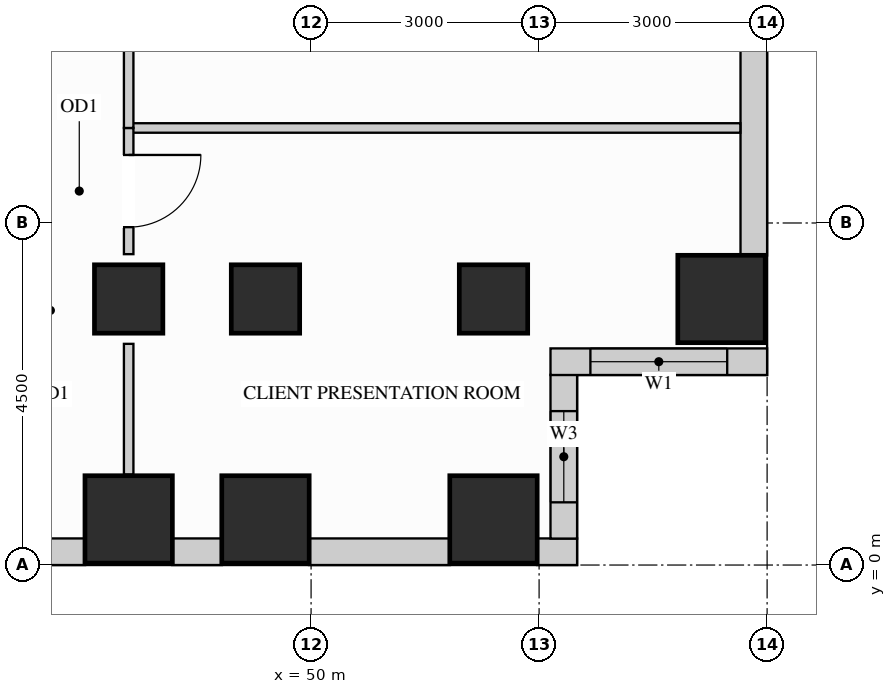
"""IFC4 building model, lengths in metres.
Left out: names, types, materials, properties, quantities, classifications, styles, units other than length and angle.
Written with IfcOpenShell. Run it as: python <this file> out.ifc"""

import sys

from ifc_helpers import new_model, si_unit, direction, frame, frame_2d, origin, origin_2d, place, context, subcontext, project, spatial, rectangle, extrude, source, transform, mapped, element, fill, save


model = new_model("IFC4")
c1 = context("Model", 3, precision=1e-05, world=origin(), true_north=direction((0.0, 1.0)))
c2 = subcontext(c1, "Body", "Model", "MODEL_VIEW")
j1 = project(units=[si_unit("LENGTHUNIT", "METRE"), si_unit("PLANEANGLEUNIT", "RADIAN")], contexts=[c1])
p1 = place(None, origin())
s1 = spatial("IfcSite", under=j1, at=p1, CompositionType="ELEMENT")
p2 = place(p1, origin())
s2 = spatial("IfcBuilding", under=s1, at=p2, CompositionType="ELEMENT")
p3 = place(p2, frame((0.0, 0.0, 84.6)))
s3 = spatial("IfcBuildingStorey", under=s2, at=p3, CompositionType="ELEMENT", Elevation=84.6)
m1 = source(origin(), c2, "Body", "SweptSolid", [
    extrude(rectangle(XDim=0.9, YDim=0.9, at=origin_2d()), origin(), (0.0, 0.0, 1.0), 3.38),
])
for number, where, z_axis, x_axis in (
    (1, (47.6, 3.5, 0.0), (0.0, 0.0, 1.0), (1.0, 0.0, 0.0)),
    (2, (49.4, 3.5, 0.0), (0.0, 0.0, 1.0), (1.0, 0.0, 0.0)),
    (3, (52.4, 3.5, 0.0), (0.0, 0.0, 1.0), (1.0, 0.0, 0.0)),
):
    element("IfcColumn", number, at=place(p3, frame(where, z_axis=z_axis, x_axis=x_axis)), inside=s3, PredefinedType="COLUMN", context=c2, shape_type="MappedRepresentation", body=[
        mapped(m1, transform((0.0, 0.0, 0.0), x_axis=(1.0, 0.0, 0.0), y_axis=(0.0, 1.0, 0.0), z_axis=(0.0, 0.0, 1.0))),
    ])
m2 = source(origin(), c2, "Body", "SweptSolid", [
    extrude(rectangle(XDim=1.15, YDim=1.15, at=origin_2d()), origin(), (0.0, 0.0, 1.0), 3.38),
])
for number, where, z_axis, x_axis in (
    (4, (55.4, 3.5, 0.0), (0.0, 0.0, 1.0), (1.0, 0.0, 0.0)),
    (5, (47.6, 0.6, 0.0), (0.0, 0.0, 1.0), (1.0, 0.0, 0.0)),
    (6, (49.4, 0.6, 0.0), (0.0, 0.0, 1.0), (1.0, 0.0, 0.0)),
    (7, (52.4, 0.6, 0.0), (0.0, 0.0, 1.0), (1.0, 0.0, 0.0)),
):
    element("IfcColumn", number, at=place(p3, frame(where, z_axis=z_axis, x_axis=x_axis)), inside=s3, PredefinedType="COLUMN", context=c2, shape_type="MappedRepresentation", body=[
        mapped(m2, transform((0.0, 0.0, 0.0), x_axis=(1.0, 0.0, 0.0), y_axis=(0.0, 1.0, 0.0), z_axis=(0.0, 0.0, 1.0))),
    ])
p4 = place(p3, frame((40.573, 0.175, 0.0), z_axis=(0.0, 0.0, 1.0), x_axis=(1.0, 0.0, 0.0)))
e8 = element("IfcWall", 8, at=p4, inside=s3, PredefinedType="SOLIDWALL", context=c2, shape_type="SweptSolid", body=[
    extrude(rectangle(XDim=6.454, YDim=0.35, at=frame_2d((3.227, 0.0))), origin(), (0.0, 0.0, 1.0), 3.365),
])
p5 = place(p4, frame((0.712, 0.0, 0.78)))
e9 = element("IfcOpeningElement", 9, at=p5, cuts=e8, PredefinedType="OPENING", context=c2, shape_type="SweptSolid", body=[
    extrude(rectangle(XDim=1.8, YDim=2.1, at=frame_2d((0.9, 1.05))), frame((0.0, 0.185, 0.0), z_axis=(0.0, -1.0, 0.0), x_axis=(1.0, 0.0, 0.0)), (0.0, 0.0, 1.0), 0.37),
])
p6 = place(p4, frame((2.905, 0.0, 0.78)))
e10 = element("IfcOpeningElement", 10, at=p6, cuts=e8, PredefinedType="OPENING", context=c2, shape_type="SweptSolid", body=[
    extrude(rectangle(XDim=1.8, YDim=2.1, at=frame_2d((0.9, 1.05))), frame((0.0, 0.185, 0.0), z_axis=(0.0, -1.0, 0.0), x_axis=(1.0, 0.0, 0.0)), (0.0, 0.0, 1.0), 0.37),
])
m3 = source(origin(), c2, "Body", "SweptSolid", [
    extrude(rectangle(XDim=0.654, YDim=0.35, at=frame_2d((0.327, 0.0))), origin(), (0.0, 0.0, 1.0), 3.365),
])
p7 = place(p3, frame((48.173, 0.175, 0.0), z_axis=(0.0, 0.0, 1.0), x_axis=(1.0, 0.0, 0.0)))
e11 = element("IfcWall", 11, at=p7, inside=s3, PredefinedType="SOLIDWALL", context=c2, shape_type="MappedRepresentation", body=[
    mapped(m3, transform((0.0, 0.0, 0.0), x_axis=(1.0, 0.0, 0.0), y_axis=(0.0, 1.0, 0.0), z_axis=(0.0, 0.0, 1.0))),
])
m4 = source(origin(), c2, "Body", "SweptSolid", [
    extrude(rectangle(XDim=1.854, YDim=0.35, at=frame_2d((0.927, 0.0))), origin(), (0.0, 0.0, 1.0), 3.365),
])
p8 = place(p3, frame((49.973, 0.175, 0.0), z_axis=(0.0, 0.0, 1.0), x_axis=(1.0, 0.0, 0.0)))
e12 = element("IfcWall", 12, at=p8, inside=s3, PredefinedType="SOLIDWALL", context=c2, shape_type="MappedRepresentation", body=[
    mapped(m4, transform((0.0, 0.0, 0.0), x_axis=(1.0, 0.0, 0.0), y_axis=(0.0, 1.0, 0.0), z_axis=(0.0, 0.0, 1.0))),
])
m5 = source(origin(), c2, "Body", "SweptSolid", [
    extrude(rectangle(XDim=0.527, YDim=0.35, at=frame_2d((0.264, 0.0))), origin(), (0.0, 0.0, 1.0), 3.365),
])
p9 = place(p3, frame((52.973, 0.175, 0.0), z_axis=(0.0, 0.0, 1.0), x_axis=(1.0, 0.0, 0.0)))
e13 = element("IfcWall", 13, at=p9, inside=s3, PredefinedType="SOLIDWALL", context=c2, shape_type="MappedRepresentation", body=[
    mapped(m5, transform((0.0, 0.0, 0.0), x_axis=(1.0, 0.0, 0.0), y_axis=(0.0, 1.0, 0.0), z_axis=(0.0, 0.0, 1.0))),
])
p10 = place(p3, frame((53.325, 0.348, 0.0), z_axis=(0.0, 0.0, 1.0), x_axis=(0.0, 1.0, 0.0)))
e14 = element("IfcWall", 14, at=p10, inside=s3, PredefinedType="SOLIDWALL", context=c2, shape_type="SweptSolid", body=[
    extrude(rectangle(XDim=2.154, YDim=0.35, at=frame_2d((1.077, 0.0))), origin(), (0.0, 0.0, 1.0), 3.365),
])
p11 = place(p10, frame((0.477, 0.0, 0.78)))
e15 = element("IfcOpeningElement", 15, at=p11, cuts=e14, PredefinedType="OPENING", context=c2, shape_type="SweptSolid", body=[
    extrude(rectangle(XDim=1.2, YDim=2.1, at=frame_2d((0.6, 1.05))), frame((0.0, 0.185, 0.0), z_axis=(0.0, -1.0, 0.0), x_axis=(1.0, 0.0, 0.0)), (0.0, 0.0, 1.0), 0.37),
])
p12 = place(p3, frame((53.15, 2.675, 0.0), z_axis=(0.0, 0.0, 1.0), x_axis=(1.0, 0.0, 0.0)))
e16 = element("IfcWall", 16, at=p12, inside=s3, PredefinedType="SOLIDWALL", context=c2, shape_type="SweptSolid", body=[
    extrude(rectangle(XDim=2.85, YDim=0.35, at=frame_2d((1.425, 0.0))), origin(), (0.0, 0.0, 1.0), 3.365),
])
p13 = place(p12, frame((0.525, 0.0, 0.78)))
e17 = element("IfcOpeningElement", 17, at=p13, cuts=e16, PredefinedType="OPENING", context=c2, shape_type="SweptSolid", body=[
    extrude(rectangle(XDim=1.8, YDim=2.1, at=frame_2d((0.9, 1.05))), frame((0.0, 0.185, 0.0), z_axis=(0.0, -1.0, 0.0), x_axis=(1.0, 0.0, 0.0)), (0.0, 0.0, 1.0), 0.37),
])
m6 = source(origin(), c2, "Body", "SweptSolid", [
    extrude(rectangle(XDim=3.354, YDim=0.35, at=frame_2d((1.677, 0.0))), origin(), (0.0, 0.0, 1.0), 3.365),
])
p14 = place(p3, frame((55.825, 4.073, 0.0), z_axis=(0.0, 0.0, 1.0), x_axis=(0.0, 1.0, 0.0)))
e18 = element("IfcWall", 18, at=p14, inside=s3, PredefinedType="SOLIDWALL", context=c2, shape_type="MappedRepresentation", body=[
    mapped(m6, transform((0.0, 0.0, 0.0), x_axis=(1.0, 0.0, 0.0), y_axis=(0.0, 1.0, 0.0), z_axis=(0.0, 0.0, 1.0))),
])
m7 = source(origin(), c2, "Body", "SweptSolid", [
    extrude(rectangle(XDim=8.048, YDim=0.125, at=frame_2d((4.024, 0.0))), origin(), (0.0, 0.0, 1.0), 3.365),
])
p15 = place(p3, frame((47.6, 5.75, 0.0), z_axis=(0.0, 0.0, 1.0), x_axis=(1.0, 0.0, 0.0)))
e19 = element("IfcWall", 19, at=p15, inside=s3, PredefinedType="PARTITIONING", context=c2, shape_type="MappedRepresentation", body=[
    mapped(m7, transform((0.0, 0.0, 0.0), x_axis=(1.0, 0.0, 0.0), y_axis=(0.0, 1.0, 0.0), z_axis=(0.0, 0.0, 1.0))),
])
p16 = place(p3, frame((47.6, 4.09, 0.0), z_axis=(0.0, 0.0, 1.0), x_axis=(0.0, 1.0, 0.0)))
e20 = element("IfcWall", 20, at=p16, inside=s3, PredefinedType="PARTITIONING", context=c2, shape_type="SweptSolid", body=[
    extrude(rectangle(XDim=1.66, YDim=0.125, at=frame_2d((0.83, 0.0))), origin(), (0.0, 0.0, 1.0), 2.677),
])
p17 = place(p16, frame((0.355, 0.0, 0.0)))
e21 = element("IfcOpeningElement", 21, at=p17, cuts=e20, PredefinedType="OPENING", context=c2, shape_type="SweptSolid", body=[
    extrude(rectangle(XDim=0.95, YDim=2.15, at=frame_2d((0.475, 1.075))), frame((0.0, 0.073, 0.0), z_axis=(0.0, -1.0, 0.0), x_axis=(1.0, 0.0, 0.0)), (0.0, 0.0, 1.0), 0.145),
])
m8 = source(origin(), c2, "Body", "SweptSolid", [
    extrude(rectangle(XDim=1.72, YDim=0.125, at=frame_2d((0.86, 0.0))), origin(), (0.0, 0.0, 1.0), 2.677),
])
p18 = place(p3, frame((47.6, 1.19, 0.0), z_axis=(0.0, 0.0, 1.0), x_axis=(0.0, 1.0, 0.0)))
e22 = element("IfcWall", 22, at=p18, inside=s3, PredefinedType="PARTITIONING", context=c2, shape_type="MappedRepresentation", body=[
    mapped(m8, transform((0.0, 0.0, 0.0), x_axis=(1.0, 0.0, 0.0), y_axis=(0.0, 1.0, 0.0), z_axis=(0.0, 0.0, 1.0))),
])
m9 = source(origin(), c2, "Body", "SweptSolid", [
    extrude(rectangle(XDim=1.66, YDim=0.125, at=frame_2d((0.83, 0.0))), origin(), (0.0, 0.0, 1.0), 2.677),
])
p19 = place(p3, frame((47.6, 5.75, 0.0), z_axis=(0.0, 0.0, 1.0), x_axis=(0.0, 1.0, 0.0)))
e23 = element("IfcWall", 23, at=p19, inside=s3, PredefinedType="PARTITIONING", context=c2, shape_type="MappedRepresentation", body=[
    mapped(m9, transform((0.0, 0.0, 0.0), x_axis=(1.0, 0.0, 0.0), y_axis=(0.0, 1.0, 0.0), z_axis=(0.0, 0.0, 1.0))),
])
m10 = source(origin(), c2, "Body", "SweptSolid", [
    extrude(rectangle(XDim=0.95, YDim=2.15, at=frame_2d((0.475, 1.075))), frame((0.0, 0.025, 0.0), z_axis=(0.0, -1.0, 0.0), x_axis=(1.0, 0.0, 0.0)), (0.0, 0.0, 1.0), 0.05),
])
p20 = place(p17, origin())
e24 = element("IfcDoor", 24, at=p20, inside=s3, OperationType="SINGLE_SWING_RIGHT", PredefinedType="DOOR", context=c2, shape_type="MappedRepresentation", body=[
    mapped(m10, transform((0.0, 0.0, 0.0), x_axis=(1.0, 0.0, 0.0), y_axis=(0.0, 1.0, 0.0), z_axis=(0.0, 0.0, 1.0))),
])
fill(e21, e24)
m11 = source(origin(), c2, "Body", "SweptSolid", [
    extrude(rectangle(XDim=1.8, YDim=2.1, at=frame_2d((0.9, 1.05))), frame((0.0, 0.03, 0.0), z_axis=(0.0, -1.0, 0.0), x_axis=(1.0, 0.0, 0.0)), (0.0, 0.0, 1.0), 0.06),
])
p21 = place(p13, origin())
e25 = element("IfcWindow", 25, at=p21, inside=s3, PartitioningType="SINGLE_PANEL", PredefinedType="WINDOW", context=c2, shape_type="MappedRepresentation", body=[
    mapped(m11, transform((0.0, 0.0, 0.0), x_axis=(1.0, 0.0, 0.0), y_axis=(0.0, 1.0, 0.0), z_axis=(0.0, 0.0, 1.0))),
])
fill(e17, e25)
m12 = source(origin(), c2, "Body", "SweptSolid", [
    extrude(rectangle(XDim=1.2, YDim=2.1, at=frame_2d((0.6, 1.05))), frame((0.0, 0.03, 0.0), z_axis=(0.0, -1.0, 0.0), x_axis=(1.0, 0.0, 0.0)), (0.0, 0.0, 1.0), 0.06),
])
p22 = place(p11, origin())
e26 = element("IfcWindow", 26, at=p22, inside=s3, PartitioningType="SINGLE_PANEL", PredefinedType="WINDOW", context=c2, shape_type="MappedRepresentation", body=[
    mapped(m12, transform((0.0, 0.0, 0.0), x_axis=(1.0, 0.0, 0.0), y_axis=(0.0, 1.0, 0.0), z_axis=(0.0, 0.0, 1.0))),
])
fill(e15, e26)
save(model, sys.argv[1])
